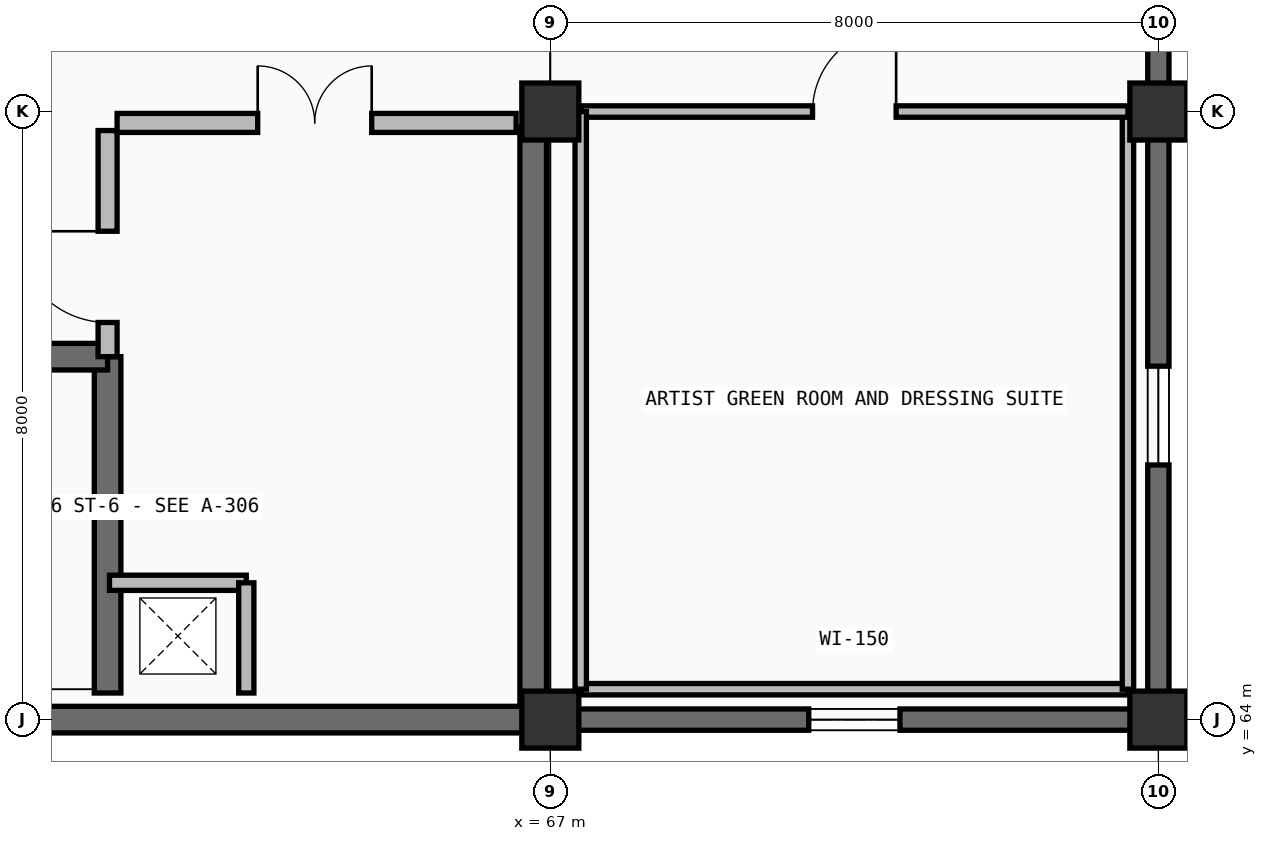
"""IFC4 building model, lengths in metres.
Left out: names, types, materials, properties, quantities, classifications, styles, units other than length and angle.
Written with IfcOpenShell. Run it as: python <this file> out.ifc"""

import sys

from ifc_helpers import new_model, si_unit, direction, frame, frame_2d, origin, origin_2d, place, context, subcontext, project, spatial, rectangle, extrude, element, fill, save


model = new_model("IFC4")
c1 = context("Model", 3, precision=1e-05, world=origin(), true_north=direction((0.0, 1.0)))
c2 = subcontext(c1, "Body", "Model", "MODEL_VIEW")
j1 = project(units=[si_unit("LENGTHUNIT", "METRE"), si_unit("PLANEANGLEUNIT", "RADIAN")], contexts=[c1])
p1 = place(None, origin())
s1 = spatial("IfcSite", under=j1, at=p1, CompositionType="ELEMENT")
p2 = place(p1, origin())
s2 = spatial("IfcBuilding", under=s1, at=p2, CompositionType="ELEMENT")
p3 = place(p2, origin())
s3 = spatial("IfcBuildingStorey", under=s2, at=p3, CompositionType="ELEMENT", Elevation=0.0)
for number, where, z_axis, x_axis in (
    (1, (67.0, 64.0, 0.0), (0.0, 0.0, 1.0), (1.0, 0.0, 0.0)),
    (2, (67.0, 72.0, 0.0), (0.0, 0.0, 1.0), (1.0, 0.0, 0.0)),
    (3, (75.0, 64.0, 0.0), (0.0, 0.0, 1.0), (1.0, 0.0, 0.0)),
    (4, (75.0, 72.0, 0.0), (0.0, 0.0, 1.0), (1.0, 0.0, 0.0)),
):
    element("IfcColumn", number, at=place(p3, frame(where, z_axis=z_axis, x_axis=x_axis)), inside=s3, PredefinedType="COLUMN", context=c2, shape_type="SweptSolid", body=[
        extrude(rectangle(XDim=0.75, YDim=0.75, at=origin_2d()), origin(), (0.0, 0.0, 1.0), 5.4),
    ])
p4 = place(p3, frame((75.0, 80.0, 0.0), z_axis=(0.0, 0.0, 1.0), x_axis=(0.0, -1.0, 0.0)))
e5 = element("IfcWall", 5, at=p4, inside=s3, PredefinedType="SOLIDWALL", context=c2, shape_type="SweptSolid", body=[
    extrude(rectangle(XDim=8.0, YDim=0.28, at=frame_2d((4.0, 0.0))), origin(), (0.0, 0.0, 1.0), 5.4),
])
p5 = place(p4, frame((3.33, 0.0, 0.85)))
e6 = element("IfcOpeningElement", 6, at=p5, cuts=e5, PredefinedType="OPENING", context=c2, shape_type="SweptSolid", body=[
    extrude(rectangle(XDim=1.34, YDim=2.5, at=frame_2d((0.67, 1.25))), frame((0.0, 0.15, 0.0), z_axis=(0.0, -1.0, 0.0), x_axis=(1.0, 0.0, 0.0)), (0.0, 0.0, 1.0), 0.3),
])
p6 = place(p3, frame((75.0, 72.0, 0.0), z_axis=(0.0, 0.0, 1.0), x_axis=(0.0, -1.0, 0.0)))
e7 = element("IfcWall", 7, at=p6, inside=s3, PredefinedType="SOLIDWALL", context=c2, shape_type="SweptSolid", body=[
    extrude(rectangle(XDim=8.0, YDim=0.28, at=frame_2d((4.0, 0.0))), origin(), (0.0, 0.0, 1.0), 5.4),
])
p7 = place(p6, frame((3.35, 0.0, 0.85)))
e8 = element("IfcOpeningElement", 8, at=p7, cuts=e7, PredefinedType="OPENING", context=c2, shape_type="SweptSolid", body=[
    extrude(rectangle(XDim=1.3, YDim=2.4, at=frame_2d((0.65, 1.2))), frame((0.0, 0.15, 0.0), z_axis=(0.0, -1.0, 0.0), x_axis=(1.0, 0.0, 0.0)), (0.0, 0.0, 1.0), 0.3),
])
p8 = place(p3, frame((75.0, 64.0, 0.0), z_axis=(0.0, 0.0, 1.0), x_axis=(-1.0, 0.0, 0.0)))
e9 = element("IfcWall", 9, at=p8, inside=s3, PredefinedType="SOLIDWALL", context=c2, shape_type="SweptSolid", body=[
    extrude(rectangle(XDim=8.0, YDim=0.28, at=frame_2d((4.0, 0.0))), origin(), (0.0, 0.0, 1.0), 5.4),
])
p9 = place(p8, frame((3.4, 0.0, 0.85)))
e10 = element("IfcOpeningElement", 10, at=p9, cuts=e9, PredefinedType="OPENING", context=c2, shape_type="SweptSolid", body=[
    extrude(rectangle(XDim=1.2, YDim=2.2, at=frame_2d((0.6, 1.1))), frame((0.0, 0.15, 0.0), z_axis=(0.0, -1.0, 0.0), x_axis=(1.0, 0.0, 0.0)), (0.0, 0.0, 1.0), 0.3),
])
p10 = place(p3, frame((67.0, 64.0, 0.0), z_axis=(0.0, 0.0, 1.0), x_axis=(-1.0, 0.0, 0.0)))
e11 = element("IfcWall", 11, at=p10, inside=s3, PredefinedType="SHEAR", context=c2, shape_type="SweptSolid", body=[
    extrude(rectangle(XDim=8.0, YDim=0.35, at=frame_2d((4.0, 0.0))), origin(), (0.0, 0.0, 1.0), 5.4),
])
p11 = place(p3, frame((61.175, 64.35, 0.0), z_axis=(0.0, 0.0, 1.0), x_axis=(0.0, 1.0, 0.0)))
e12 = element("IfcWall", 12, at=p11, inside=s3, PredefinedType="SHEAR", context=c2, shape_type="SweptSolid", body=[
    extrude(rectangle(XDim=4.425, YDim=0.35, at=frame_2d((2.212, 0.0))), origin(), (0.0, 0.0, 1.0), 5.1),
])
p12 = place(p3, frame((66.775, 64.2, 0.0), z_axis=(0.0, 0.0, 1.0), x_axis=(0.0, 1.0, 0.0)))
e13 = element("IfcWall", 13, at=p12, inside=s3, PredefinedType="SHEAR", context=c2, shape_type="SweptSolid", body=[
    extrude(rectangle(XDim=7.6, YDim=0.35, at=frame_2d((3.8, 0.0))), origin(), (0.0, 0.0, 1.0), 5.1),
])
p13 = place(p3, frame((61.2, 65.8, 0.0), z_axis=(0.0, 0.0, 1.0), x_axis=(1.0, 0.0, 0.0)))
e14 = element("IfcWall", 14, at=p13, inside=s3, PredefinedType="PARTITIONING", context=c2, shape_type="SweptSolid", body=[
    extrude(rectangle(XDim=1.8, YDim=0.2, at=frame_2d((0.9, 0.0))), origin(), (0.0, 0.0, 1.0), 5.1),
])
p14 = place(p3, frame((63.0, 64.35, 0.0), z_axis=(0.0, 0.0, 1.0), x_axis=(0.0, 1.0, 0.0)))
e15 = element("IfcWall", 15, at=p14, inside=s3, PredefinedType="PARTITIONING", context=c2, shape_type="SweptSolid", body=[
    extrude(rectangle(XDim=1.45, YDim=0.2, at=frame_2d((0.725, 0.0))), origin(), (0.0, 0.0, 1.0), 5.1),
])
p15 = place(p3, frame((51.35, 68.775, 0.0), z_axis=(0.0, 0.0, 1.0), x_axis=(1.0, 0.0, 0.0)))
e16 = element("IfcWall", 16, at=p15, inside=s3, PredefinedType="SHEAR", context=c2, shape_type="SweptSolid", body=[
    extrude(rectangle(XDim=9.825, YDim=0.35, at=frame_2d((4.913, 0.0))), origin(), (0.0, 0.0, 1.0), 5.1),
])
p16 = place(p15, frame((0.4, 0.0, 0.0)))
e17 = element("IfcOpeningElement", 17, at=p16, cuts=e16, PredefinedType="OPENING", context=c2, shape_type="SweptSolid", body=[
    extrude(rectangle(XDim=1.85, YDim=2.25, at=frame_2d((0.925, 1.125))), frame((0.0, 0.185, 0.0), z_axis=(0.0, -1.0, 0.0), x_axis=(1.0, 0.0, 0.0)), (0.0, 0.0, 1.0), 0.37),
])
p17 = place(p3, frame((61.175, 68.775, 0.0), z_axis=(0.0, 0.0, 1.0), x_axis=(0.0, 1.0, 0.0)))
e18 = element("IfcWall", 18, at=p17, inside=s3, PredefinedType="PARTITIONING", context=c2, shape_type="SweptSolid", body=[
    extrude(rectangle(XDim=2.975, YDim=0.25, at=frame_2d((1.488, 0.0))), origin(), (0.0, 0.0, 1.0), 5.1),
])
p18 = place(p17, frame((0.45, 0.0, 0.0)))
e19 = element("IfcOpeningElement", 19, at=p18, cuts=e18, PredefinedType="OPENING", context=c2, shape_type="SweptSolid", body=[
    extrude(rectangle(XDim=1.2, YDim=2.2, at=frame_2d((0.6, 1.1))), frame((0.0, 0.135, 0.0), z_axis=(0.0, -1.0, 0.0), x_axis=(1.0, 0.0, 0.0)), (0.0, 0.0, 1.0), 0.27),
])
p19 = place(p3, frame((61.3, 71.85, 0.0), z_axis=(0.0, 0.0, 1.0), x_axis=(1.0, 0.0, 0.0)))
e20 = element("IfcWall", 20, at=p19, inside=s3, PredefinedType="PARTITIONING", context=c2, shape_type="SweptSolid", body=[
    extrude(rectangle(XDim=5.25, YDim=0.25, at=frame_2d((2.625, 0.0))), origin(), (0.0, 0.0, 1.0), 4.335),
])
p20 = place(p19, frame((1.85, 0.0, 0.0)))
e21 = element("IfcOpeningElement", 21, at=p20, cuts=e20, PredefinedType="OPENING", context=c2, shape_type="SweptSolid", body=[
    extrude(rectangle(XDim=1.5, YDim=2.2, at=frame_2d((0.75, 1.1))), frame((0.0, 0.135, 0.0), z_axis=(0.0, -1.0, 0.0), x_axis=(1.0, 0.0, 0.0)), (0.0, 0.0, 1.0), 0.27),
])
p21 = place(p3, frame((67.4, 64.4, 0.0), z_axis=(0.0, 0.0, 1.0), x_axis=(1.0, 0.0, 0.0)))
e22 = element("IfcWall", 22, at=p21, inside=s3, PredefinedType="PARTITIONING", context=c2, shape_type="SweptSolid", body=[
    extrude(rectangle(XDim=7.2, YDim=0.15, at=frame_2d((3.6, 0.0))), origin(), (0.0, 0.0, 1.0), 4.405),
])
p22 = place(p3, frame((74.6, 64.4, 0.0), z_axis=(0.0, 0.0, 1.0), x_axis=(0.0, 1.0, 0.0)))
e23 = element("IfcWall", 23, at=p22, inside=s3, PredefinedType="PARTITIONING", context=c2, shape_type="SweptSolid", body=[
    extrude(rectangle(XDim=7.6, YDim=0.15, at=frame_2d((3.8, 0.0))), origin(), (0.0, 0.0, 1.0), 4.405),
])
p23 = place(p3, frame((67.4, 72.0, 0.0), z_axis=(0.0, 0.0, 1.0), x_axis=(1.0, 0.0, 0.0)))
e24 = element("IfcWall", 24, at=p23, inside=s3, PredefinedType="PARTITIONING", context=c2, shape_type="SweptSolid", body=[
    extrude(rectangle(XDim=7.2, YDim=0.15, at=frame_2d((3.6, 0.0))), origin(), (0.0, 0.0, 1.0), 4.335),
])
p24 = place(p23, frame((3.05, 0.0, 0.0)))
e25 = element("IfcOpeningElement", 25, at=p24, cuts=e24, PredefinedType="OPENING", context=c2, shape_type="SweptSolid", body=[
    extrude(rectangle(XDim=1.1, YDim=2.16, at=frame_2d((0.55, 1.08))), frame((0.0, 0.085, 0.0), z_axis=(0.0, -1.0, 0.0), x_axis=(1.0, 0.0, 0.0)), (0.0, 0.0, 1.0), 0.17),
])
p25 = place(p3, frame((67.4, 64.4, 0.0), z_axis=(0.0, 0.0, 1.0), x_axis=(0.0, 1.0, 0.0)))
e26 = element("IfcWall", 26, at=p25, inside=s3, PredefinedType="PARTITIONING", context=c2, shape_type="SweptSolid", body=[
    extrude(rectangle(XDim=7.6, YDim=0.15, at=frame_2d((3.8, 0.0))), origin(), (0.0, 0.0, 1.0), 4.385),
])
p26 = place(p7, origin())
e27 = element("IfcWindow", 27, at=p26, inside=s3, PartitioningType="SINGLE_PANEL", PredefinedType="WINDOW", context=c2, shape_type="SweptSolid", body=[
    extrude(rectangle(XDim=1.3, YDim=2.4, at=frame_2d((0.65, 1.2))), frame((0.0, 0.03, 0.0), z_axis=(0.0, -1.0, 0.0), x_axis=(1.0, 0.0, 0.0)), (0.0, 0.0, 1.0), 0.06),
])
fill(e8, e27)
p27 = place(p9, origin())
e28 = element("IfcWindow", 28, at=p27, inside=s3, PartitioningType="SINGLE_PANEL", PredefinedType="WINDOW", context=c2, shape_type="SweptSolid", body=[
    extrude(rectangle(XDim=1.2, YDim=2.2, at=frame_2d((0.6, 1.1))), frame((0.0, 0.03, 0.0), z_axis=(0.0, -1.0, 0.0), x_axis=(1.0, 0.0, 0.0)), (0.0, 0.0, 1.0), 0.06),
])
fill(e10, e28)
p28 = place(p18, origin())
e29 = element("IfcDoor", 29, at=p28, inside=s3, OperationType="SINGLE_SWING_RIGHT", PredefinedType="DOOR", context=c2, shape_type="SweptSolid", body=[
    extrude(rectangle(XDim=1.2, YDim=2.2, at=frame_2d((0.6, 1.1))), frame((0.0, 0.025, 0.0), z_axis=(0.0, -1.0, 0.0), x_axis=(1.0, 0.0, 0.0)), (0.0, 0.0, 1.0), 0.05),
])
fill(e19, e29)
p29 = place(p20, origin())
e30 = element("IfcDoor", 30, at=p29, inside=s3, OperationType="DOUBLE_DOOR_SINGLE_SWING", PredefinedType="DOOR", context=c2, shape_type="SweptSolid", body=[
    extrude(rectangle(XDim=1.5, YDim=2.2, at=frame_2d((0.75, 1.1))), frame((0.0, 0.025, 0.0), z_axis=(0.0, -1.0, 0.0), x_axis=(1.0, 0.0, 0.0)), (0.0, 0.0, 1.0), 0.05),
])
fill(e21, e30)
p30 = place(p24, origin())
e31 = element("IfcDoor", 31, at=p30, inside=s3, OperationType="SINGLE_SWING_RIGHT", PredefinedType="DOOR", context=c2, shape_type="SweptSolid", body=[
    extrude(rectangle(XDim=1.1, YDim=2.16, at=frame_2d((0.55, 1.08))), frame((0.0, 0.025, 0.0), z_axis=(0.0, -1.0, 0.0), x_axis=(1.0, 0.0, 0.0)), (0.0, 0.0, 1.0), 0.05),
])
fill(e25, e31)
save(model, sys.argv[1])
